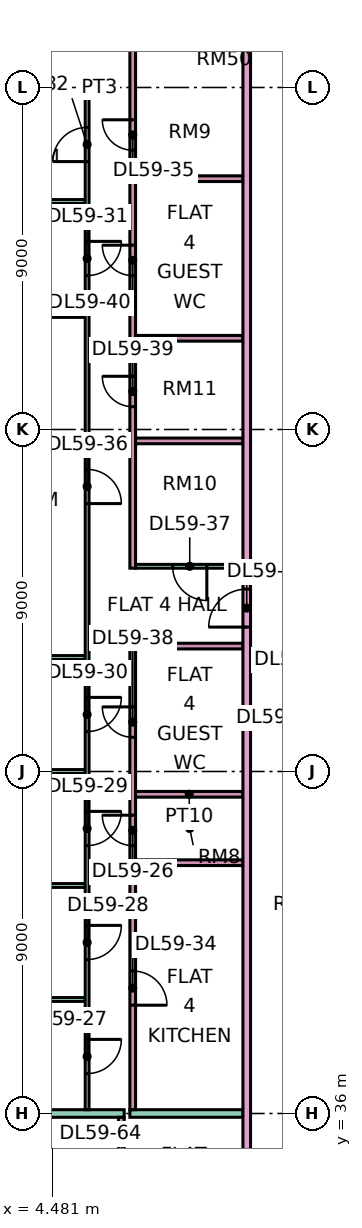
"""IFC4 building model, lengths in metres.
Left out: names, types, materials, properties, quantities, classifications, styles, units other than length and angle.
Written with IfcOpenShell. Run it as: python <this file> out.ifc"""

import sys

from ifc_helpers import new_model, si_unit, direction, frame, frame_2d, origin, place, context, subcontext, project, spatial, rectangle, extrude, element, fill, save


model = new_model("IFC4")
c1 = context("Model", 3, precision=1e-05, world=origin(), true_north=direction((0.0, 1.0)))
c2 = subcontext(c1, "Body", "Model", "MODEL_VIEW")
j1 = project(units=[si_unit("LENGTHUNIT", "METRE"), si_unit("PLANEANGLEUNIT", "RADIAN")], contexts=[c1])
p1 = place(None, origin())
s1 = spatial("IfcSite", under=j1, at=p1, CompositionType="ELEMENT")
p2 = place(p1, origin())
s2 = spatial("IfcBuilding", under=s1, at=p2, CompositionType="ELEMENT")
p3 = place(p2, frame((0.0, 0.0, 249.15)))
s3 = spatial("IfcBuildingStorey", under=s2, at=p3, CompositionType="ELEMENT", Elevation=249.15)
p4 = place(p3, frame((-1.351, 60.0, 0.0), z_axis=(0.0, 0.0, 1.0), x_axis=(1.0, 0.0, 0.0)))
e1 = element("IfcWall", 1, at=p4, inside=s3, PredefinedType="PARTITIONING", context=c2, shape_type="SweptSolid", body=[
    extrude(rectangle(XDim=6.701, YDim=0.1, at=frame_2d((3.351, 0.0))), origin(), (0.0, 0.0, 1.0), 3.35),
])
p5 = place(p3, frame((0.0, 36.0, 0.0), z_axis=(0.0, 0.0, 1.0), x_axis=(1.0, 0.0, 0.0)))
e2 = element("IfcWall", 2, at=p5, inside=s3, PredefinedType="PARTITIONING", context=c2, shape_type="SweptSolid", body=[
    extrude(rectangle(XDim=6.375, YDim=0.2, at=frame_2d((3.188, 0.0))), origin(), (0.0, 0.0, 1.0), 3.35),
])
p6 = place(p3, frame((0.0, 48.0, 0.0), z_axis=(0.0, 0.0, 1.0), x_axis=(1.0, 0.0, 0.0)))
e3 = element("IfcWall", 3, at=p6, inside=s3, PredefinedType="PARTITIONING", context=c2, shape_type="SweptSolid", body=[
    extrude(rectangle(XDim=5.35, YDim=0.1, at=frame_2d((2.675, 0.0))), origin(), (0.0, 0.0, 1.0), 3.35),
])
p7 = place(p3, frame((-1.35, 57.0, 0.0), z_axis=(0.0, 0.0, 1.0), x_axis=(1.0, 0.0, 0.0)))
e4 = element("IfcWall", 4, at=p7, inside=s3, PredefinedType="PARTITIONING", context=c2, shape_type="SweptSolid", body=[
    extrude(rectangle(XDim=6.7, YDim=0.1, at=frame_2d((3.35, 0.0))), origin(), (0.0, 0.0, 1.0), 3.35),
])
for number, where, z_axis, x_axis in (
    (5, (0.074, 39.0, 0.0), (0.0, 0.0, 1.0), (1.0, 0.0, 0.0)),
    (6, (0.074, 42.0, 0.0), (0.0, 0.0, 1.0), (1.0, 0.0, 0.0)),
    (7, (0.074, 45.0, 0.0), (0.0, 0.0, 1.0), (1.0, 0.0, 0.0)),
):
    element("IfcWall", number, at=place(p3, frame(where, z_axis=z_axis, x_axis=x_axis)), inside=s3, PredefinedType="PARTITIONING", context=c2, shape_type="SweptSolid", body=[
        extrude(rectangle(XDim=5.276, YDim=0.1, at=frame_2d((2.638, 0.0))), origin(), (0.0, 0.0, 1.0), 3.35),
    ])
p8 = place(p3, frame((5.4, 36.1, 0.0), z_axis=(0.0, 0.0, 1.0), x_axis=(0.0, 1.0, 0.0)))
e8 = element("IfcWall", 8, at=p8, inside=s3, PredefinedType="PARTITIONING", context=c2, shape_type="SweptSolid", body=[
    extrude(rectangle(XDim=26.95, YDim=0.1, at=frame_2d((13.475, 0.0))), origin(), (0.0, 0.0, 1.0), 3.35),
])
p9 = place(p8, frame((0.95, 0.0, 0.0)))
e9 = element("IfcOpeningElement", 9, at=p9, cuts=e8, PredefinedType="OPENING", context=c2, shape_type="SweptSolid", body=[
    extrude(rectangle(XDim=0.9, YDim=2.1, at=frame_2d((0.45, 1.05))), frame((0.0, 0.06, 0.0), z_axis=(0.0, -1.0, 0.0), x_axis=(1.0, 0.0, 0.0)), (0.0, 0.0, 1.0), 0.12),
])
p10 = place(p8, frame((3.95, 0.0, 0.0)))
e10 = element("IfcOpeningElement", 10, at=p10, cuts=e8, PredefinedType="OPENING", context=c2, shape_type="SweptSolid", body=[
    extrude(rectangle(XDim=0.9, YDim=2.1, at=frame_2d((0.45, 1.05))), frame((0.0, 0.06, 0.0), z_axis=(0.0, -1.0, 0.0), x_axis=(1.0, 0.0, 0.0)), (0.0, 0.0, 1.0), 0.12),
])
p11 = place(p8, frame((6.95, 0.0, 0.0)))
e11 = element("IfcOpeningElement", 11, at=p11, cuts=e8, PredefinedType="OPENING", context=c2, shape_type="SweptSolid", body=[
    extrude(rectangle(XDim=0.9, YDim=2.1, at=frame_2d((0.45, 1.05))), frame((0.0, 0.06, 0.0), z_axis=(0.0, -1.0, 0.0), x_axis=(1.0, 0.0, 0.0)), (0.0, 0.0, 1.0), 0.12),
])
p12 = place(p8, frame((9.95, 0.0, 0.0)))
e12 = element("IfcOpeningElement", 12, at=p12, cuts=e8, PredefinedType="OPENING", context=c2, shape_type="SweptSolid", body=[
    extrude(rectangle(XDim=0.9, YDim=2.1, at=frame_2d((0.45, 1.05))), frame((0.0, 0.06, 0.0), z_axis=(0.0, -1.0, 0.0), x_axis=(1.0, 0.0, 0.0)), (0.0, 0.0, 1.0), 0.12),
])
p13 = place(p8, frame((21.95, 0.0, 0.0)))
e13 = element("IfcOpeningElement", 13, at=p13, cuts=e8, PredefinedType="OPENING", context=c2, shape_type="SweptSolid", body=[
    extrude(rectangle(XDim=0.9, YDim=2.1, at=frame_2d((0.45, 1.05))), frame((0.0, 0.06, 0.0), z_axis=(0.0, -1.0, 0.0), x_axis=(1.0, 0.0, 0.0)), (0.0, 0.0, 1.0), 0.12),
])
p14 = place(p8, frame((24.95, 0.0, 0.0)))
e14 = element("IfcOpeningElement", 14, at=p14, cuts=e8, PredefinedType="OPENING", context=c2, shape_type="SweptSolid", body=[
    extrude(rectangle(XDim=0.9, YDim=2.1, at=frame_2d((0.45, 1.05))), frame((0.0, 0.06, 0.0), z_axis=(0.0, -1.0, 0.0), x_axis=(1.0, 0.0, 0.0)), (0.0, 0.0, 1.0), 0.12),
])
p15 = place(p8, frame((15.95, 0.0, 0.0)))
e15 = element("IfcOpeningElement", 15, at=p15, cuts=e8, PredefinedType="OPENING", context=c2, shape_type="SweptSolid", body=[
    extrude(rectangle(XDim=0.9, YDim=2.1, at=frame_2d((0.45, 1.05))), frame((0.0, 0.06, 0.0), z_axis=(0.0, -1.0, 0.0), x_axis=(1.0, 0.0, 0.0)), (0.0, 0.0, 1.0), 0.12),
])
p16 = place(p3, frame((5.45, 63.0, 0.0), z_axis=(0.0, 0.0, 1.0), x_axis=(1.0, 0.0, 0.0)))
e16 = element("IfcWall", 16, at=p16, inside=s3, PredefinedType="PARTITIONING", context=c2, shape_type="SweptSolid", body=[
    extrude(rectangle(XDim=0.55, YDim=0.1, at=frame_2d((0.275, 0.0))), origin(), (0.0, 0.0, 1.0), 3.35),
])
p17 = place(p3, frame((6.3, 26.325, 0.0), z_axis=(0.0, 0.0, 1.0), x_axis=(0.0, 1.0, 0.0)))
e17 = element("IfcWall", 17, at=p17, inside=s3, PredefinedType="PARTITIONING", context=c2, shape_type="SweptSolid", body=[
    extrude(rectangle(XDim=9.575, YDim=0.15, at=frame_2d((4.788, 0.0))), origin(), (0.0, 0.0, 1.0), 3.35),
])
p18 = place(p17, frame((4.575, 0.0, 0.0)))
e18 = element("IfcOpeningElement", 18, at=p18, cuts=e17, PredefinedType="OPENING", context=c2, shape_type="SweptSolid", body=[
    extrude(rectangle(XDim=0.8, YDim=2.1, at=frame_2d((0.4, 1.05))), frame((0.0, 0.085, 0.0), z_axis=(0.0, -1.0, 0.0), x_axis=(1.0, 0.0, 0.0)), (0.0, 0.0, 1.0), 0.17),
])
p19 = place(p17, frame((7.725, 0.0, 0.0)))
e19 = element("IfcOpeningElement", 19, at=p19, cuts=e17, PredefinedType="OPENING", context=c2, shape_type="SweptSolid", body=[
    extrude(rectangle(XDim=0.9, YDim=2.1, at=frame_2d((0.45, 1.05))), frame((0.0, 0.085, 0.0), z_axis=(0.0, -1.0, 0.0), x_axis=(1.0, 0.0, 0.0)), (0.0, 0.0, 1.0), 0.17),
])
p20 = place(p3, frame((6.525, 36.0, 0.0), z_axis=(0.0, 0.0, 1.0), x_axis=(1.0, 0.0, 0.0)))
e20 = element("IfcWall", 20, at=p20, inside=s3, PredefinedType="PARTITIONING", context=c2, shape_type="SweptSolid", body=[
    extrude(rectangle(XDim=2.975, YDim=0.2, at=frame_2d((1.488, 0.0))), origin(), (0.0, 0.0, 1.0), 3.35),
])
p21 = place(p3, frame((6.6, 36.1, 0.0), z_axis=(0.0, 0.0, 1.0), x_axis=(0.0, 1.0, 0.0)))
e21 = element("IfcWall", 21, at=p21, inside=s3, PredefinedType="PARTITIONING", context=c2, shape_type="SweptSolid", body=[
    extrude(rectangle(XDim=12.275, YDim=0.15, at=frame_2d((6.137, 0.0))), origin(), (0.0, 0.0, 1.0), 3.35),
])
p22 = place(p21, frame((6.95, 0.0, 0.0)))
e22 = element("IfcOpeningElement", 22, at=p22, cuts=e21, PredefinedType="OPENING", context=c2, shape_type="SweptSolid", body=[
    extrude(rectangle(XDim=0.8, YDim=2.1, at=frame_2d((0.4, 1.05))), frame((0.0, 0.085, 0.0), z_axis=(0.0, -1.0, 0.0), x_axis=(1.0, 0.0, 0.0)), (0.0, 0.0, 1.0), 0.17),
])
p23 = place(p21, frame((2.75, 0.0, 0.0)))
e23 = element("IfcOpeningElement", 23, at=p23, cuts=e21, PredefinedType="OPENING", context=c2, shape_type="SweptSolid", body=[
    extrude(rectangle(XDim=0.9, YDim=2.1, at=frame_2d((0.45, 1.05))), frame((0.0, 0.085, 0.0), z_axis=(0.0, -1.0, 0.0), x_axis=(1.0, 0.0, 0.0)), (0.0, 0.0, 1.0), 0.17),
])
p24 = place(p21, frame((9.8, 0.0, 0.0)))
e24 = element("IfcOpeningElement", 24, at=p24, cuts=e21, PredefinedType="OPENING", context=c2, shape_type="SweptSolid", body=[
    extrude(rectangle(XDim=0.8, YDim=2.1, at=frame_2d((0.4, 1.05))), frame((0.0, 0.085, 0.0), z_axis=(0.0, -1.0, 0.0), x_axis=(1.0, 0.0, 0.0)), (0.0, 0.0, 1.0), 0.17),
])
p25 = place(p3, frame((6.6, 50.35, 0.0), z_axis=(0.0, 0.0, 1.0), x_axis=(0.0, 1.0, 0.0)))
e25 = element("IfcWall", 25, at=p25, inside=s3, PredefinedType="PARTITIONING", context=c2, shape_type="SweptSolid", body=[
    extrude(rectangle(XDim=14.0, YDim=0.15, at=frame_2d((7.0, 0.0))), origin(), (0.0, 0.0, 1.0), 3.35),
])
p26 = place(p25, frame((11.0, 0.0, 0.0)))
e26 = element("IfcOpeningElement", 26, at=p26, cuts=e25, PredefinedType="OPENING", context=c2, shape_type="SweptSolid", body=[
    extrude(rectangle(XDim=0.8, YDim=2.1, at=frame_2d((0.4, 1.05))), frame((0.0, 0.085, 0.0), z_axis=(0.0, -1.0, 0.0), x_axis=(1.0, 0.0, 0.0)), (0.0, 0.0, 1.0), 0.17),
])
p27 = place(p25, frame((4.25, 0.0, 0.0)))
e27 = element("IfcOpeningElement", 27, at=p27, cuts=e25, PredefinedType="OPENING", context=c2, shape_type="SweptSolid", body=[
    extrude(rectangle(XDim=0.8, YDim=2.1, at=frame_2d((0.4, 1.05))), frame((0.0, 0.085, 0.0), z_axis=(0.0, -1.0, 0.0), x_axis=(1.0, 0.0, 0.0)), (0.0, 0.0, 1.0), 0.17),
])
p28 = place(p25, frame((7.7, 0.0, 0.0)))
e28 = element("IfcOpeningElement", 28, at=p28, cuts=e25, PredefinedType="OPENING", context=c2, shape_type="SweptSolid", body=[
    extrude(rectangle(XDim=0.8, YDim=2.1, at=frame_2d((0.4, 1.05))), frame((0.0, 0.085, 0.0), z_axis=(0.0, -1.0, 0.0), x_axis=(1.0, 0.0, 0.0)), (0.0, 0.0, 1.0), 0.17),
])
for number, where, z_axis, x_axis in (
    (29, (6.675, 42.6, 0.0), (0.0, 0.0, 1.0), (1.0, 0.0, 0.0)),
    (30, (6.675, 44.4, 0.0), (0.0, 0.0, 1.0), (1.0, 0.0, 0.0)),
    (31, (6.675, 48.3, 0.0), (0.0, 0.0, 1.0), (1.0, 0.0, 0.0)),
):
    element("IfcWall", number, at=place(p3, frame(where, z_axis=z_axis, x_axis=x_axis)), inside=s3, PredefinedType="PARTITIONING", context=c2, shape_type="SweptSolid", body=[
        extrude(rectangle(XDim=2.825, YDim=0.15, at=frame_2d((1.413, 0.0))), origin(), (0.0, 0.0, 1.0), 3.35),
    ])
p29 = place(p3, frame((6.675, 50.4, 0.0), z_axis=(0.0, 0.0, 1.0), x_axis=(1.0, 0.0, 0.0)))
e32 = element("IfcWall", 32, at=p29, inside=s3, PredefinedType="PARTITIONING", context=c2, shape_type="SweptSolid", body=[
    extrude(rectangle(XDim=2.825, YDim=0.1, at=frame_2d((1.413, 0.0))), origin(), (0.0, 0.0, 1.0), 3.35),
])
p30 = place(p29, frame((0.975, 0.0, 0.0)))
e33 = element("IfcOpeningElement", 33, at=p30, cuts=e32, PredefinedType="OPENING", context=c2, shape_type="SweptSolid", body=[
    extrude(rectangle(XDim=0.9, YDim=2.1, at=frame_2d((0.45, 1.05))), frame((0.0, 0.06, 0.0), z_axis=(0.0, -1.0, 0.0), x_axis=(1.0, 0.0, 0.0)), (0.0, 0.0, 1.0), 0.12),
])
for number, where, z_axis, x_axis in (
    (34, (6.675, 53.7, 0.0), (0.0, 0.0, 1.0), (1.0, 0.0, 0.0)),
    (35, (6.675, 56.4, 0.0), (0.0, 0.0, 1.0), (1.0, 0.0, 0.0)),
    (36, (6.675, 60.6, 0.0), (0.0, 0.0, 1.0), (1.0, 0.0, 0.0)),
):
    element("IfcWall", number, at=place(p3, frame(where, z_axis=z_axis, x_axis=x_axis)), inside=s3, PredefinedType="PARTITIONING", context=c2, shape_type="SweptSolid", body=[
        extrude(rectangle(XDim=2.825, YDim=0.15, at=frame_2d((1.413, 0.0))), origin(), (0.0, 0.0, 1.0), 3.35),
    ])
p31 = place(p3, frame((9.6, 20.0, 0.0), z_axis=(0.0, 0.0, 1.0), x_axis=(0.0, 1.0, 0.0)))
e37 = element("IfcWall", 37, at=p31, inside=s3, PredefinedType="PARTITIONING", context=c2, shape_type="SweptSolid", body=[
    extrude(rectangle(XDim=44.35, YDim=0.2, at=frame_2d((22.175, 0.0))), origin(), (0.0, 0.0, 1.0), 3.35),
])
p32 = place(p31, frame((28.8, 0.0, 0.0)))
e38 = element("IfcOpeningElement", 38, at=p32, cuts=e37, PredefinedType="OPENING", context=c2, shape_type="SweptSolid", body=[
    extrude(rectangle(XDim=1.0, YDim=2.1, at=frame_2d((0.5, 1.05))), frame((0.0, 0.11, 0.0), z_axis=(0.0, -1.0, 0.0), x_axis=(1.0, 0.0, 0.0)), (0.0, 0.0, 1.0), 0.22),
])
p33 = place(p31, frame((0.6, 0.0, 0.0)))
e39 = element("IfcOpeningElement", 39, at=p33, cuts=e37, PredefinedType="OPENING", context=c2, shape_type="SweptSolid", body=[
    extrude(rectangle(XDim=1.2, YDim=2.1, at=frame_2d((0.6, 1.05))), frame((0.0, 0.11, 0.0), z_axis=(0.0, -1.0, 0.0), x_axis=(1.0, 0.0, 0.0)), (0.0, 0.0, 1.0), 0.22),
])
p34 = place(p31, frame((3.9, 0.0, 0.0)))
e40 = element("IfcOpeningElement", 40, at=p34, cuts=e37, PredefinedType="OPENING", context=c2, shape_type="SweptSolid", body=[
    extrude(rectangle(XDim=1.0, YDim=2.1, at=frame_2d((0.5, 1.05))), frame((0.0, 0.11, 0.0), z_axis=(0.0, -1.0, 0.0), x_axis=(1.0, 0.0, 0.0)), (0.0, 0.0, 1.0), 0.22),
])
p35 = place(p22, frame((0.8, 0.0, 0.0), z_axis=(0.0, 0.0, 1.0), x_axis=(-1.0, 0.0, 0.0)))
e41 = element("IfcDoor", 41, at=p35, inside=s3, OperationType="SINGLE_SWING_RIGHT", PredefinedType="DOOR", context=c2, shape_type="SweptSolid", body=[
    extrude(rectangle(XDim=0.8, YDim=2.1, at=frame_2d((0.4, 1.05))), frame((0.0, 0.025, 0.0), z_axis=(0.0, -1.0, 0.0), x_axis=(1.0, 0.0, 0.0)), (0.0, 0.0, 1.0), 0.05),
])
fill(e22, e41)
p36 = place(p9, origin())
e42 = element("IfcDoor", 42, at=p36, inside=s3, OperationType="SINGLE_SWING_RIGHT", PredefinedType="DOOR", context=c2, shape_type="SweptSolid", body=[
    extrude(rectangle(XDim=0.9, YDim=2.1, at=frame_2d((0.45, 1.05))), frame((0.0, 0.025, 0.0), z_axis=(0.0, -1.0, 0.0), x_axis=(1.0, 0.0, 0.0)), (0.0, 0.0, 1.0), 0.05),
])
fill(e9, e42)
p37 = place(p10, origin())
e43 = element("IfcDoor", 43, at=p37, inside=s3, OperationType="SINGLE_SWING_RIGHT", PredefinedType="DOOR", context=c2, shape_type="SweptSolid", body=[
    extrude(rectangle(XDim=0.9, YDim=2.1, at=frame_2d((0.45, 1.05))), frame((0.0, 0.025, 0.0), z_axis=(0.0, -1.0, 0.0), x_axis=(1.0, 0.0, 0.0)), (0.0, 0.0, 1.0), 0.05),
])
fill(e10, e43)
p38 = place(p11, origin())
e44 = element("IfcDoor", 44, at=p38, inside=s3, OperationType="SINGLE_SWING_RIGHT", PredefinedType="DOOR", context=c2, shape_type="SweptSolid", body=[
    extrude(rectangle(XDim=0.9, YDim=2.1, at=frame_2d((0.45, 1.05))), frame((0.0, 0.025, 0.0), z_axis=(0.0, -1.0, 0.0), x_axis=(1.0, 0.0, 0.0)), (0.0, 0.0, 1.0), 0.05),
])
fill(e11, e44)
p39 = place(p12, origin())
e45 = element("IfcDoor", 45, at=p39, inside=s3, OperationType="SINGLE_SWING_RIGHT", PredefinedType="DOOR", context=c2, shape_type="SweptSolid", body=[
    extrude(rectangle(XDim=0.9, YDim=2.1, at=frame_2d((0.45, 1.05))), frame((0.0, 0.025, 0.0), z_axis=(0.0, -1.0, 0.0), x_axis=(1.0, 0.0, 0.0)), (0.0, 0.0, 1.0), 0.05),
])
fill(e12, e45)
p40 = place(p13, origin())
e46 = element("IfcDoor", 46, at=p40, inside=s3, OperationType="SINGLE_SWING_RIGHT", PredefinedType="DOOR", context=c2, shape_type="SweptSolid", body=[
    extrude(rectangle(XDim=0.9, YDim=2.1, at=frame_2d((0.45, 1.05))), frame((0.0, 0.025, 0.0), z_axis=(0.0, -1.0, 0.0), x_axis=(1.0, 0.0, 0.0)), (0.0, 0.0, 1.0), 0.05),
])
fill(e13, e46)
p41 = place(p14, origin())
e47 = element("IfcDoor", 47, at=p41, inside=s3, OperationType="SINGLE_SWING_LEFT", PredefinedType="DOOR", context=c2, shape_type="SweptSolid", body=[
    extrude(rectangle(XDim=0.9, YDim=2.1, at=frame_2d((0.45, 1.05))), frame((0.0, 0.025, 0.0), z_axis=(0.0, -1.0, 0.0), x_axis=(1.0, 0.0, 0.0)), (0.0, 0.0, 1.0), 0.05),
])
fill(e14, e47)
p42 = place(p32, origin())
e48 = element("IfcDoor", 48, at=p42, inside=s3, OperationType="SINGLE_SWING_LEFT", PredefinedType="DOOR", context=c2, shape_type="SweptSolid", body=[
    extrude(rectangle(XDim=1.0, YDim=2.1, at=frame_2d((0.5, 1.05))), frame((0.0, 0.025, 0.0), z_axis=(0.0, -1.0, 0.0), x_axis=(1.0, 0.0, 0.0)), (0.0, 0.0, 1.0), 0.05),
])
fill(e38, e48)
p43 = place(p23, frame((0.9, 0.0, 0.0), z_axis=(0.0, 0.0, 1.0), x_axis=(-1.0, 0.0, 0.0)))
e49 = element("IfcDoor", 49, at=p43, inside=s3, OperationType="SINGLE_SWING_LEFT", PredefinedType="DOOR", context=c2, shape_type="SweptSolid", body=[
    extrude(rectangle(XDim=0.9, YDim=2.1, at=frame_2d((0.45, 1.05))), frame((0.0, 0.025, 0.0), z_axis=(0.0, -1.0, 0.0), x_axis=(1.0, 0.0, 0.0)), (0.0, 0.0, 1.0), 0.05),
])
fill(e23, e49)
p44 = place(p26, frame((0.8, 0.0, 0.0), z_axis=(0.0, 0.0, 1.0), x_axis=(-1.0, 0.0, 0.0)))
e50 = element("IfcDoor", 50, at=p44, inside=s3, OperationType="SINGLE_SWING_RIGHT", PredefinedType="DOOR", context=c2, shape_type="SweptSolid", body=[
    extrude(rectangle(XDim=0.8, YDim=2.1, at=frame_2d((0.4, 1.05))), frame((0.0, 0.025, 0.0), z_axis=(0.0, -1.0, 0.0), x_axis=(1.0, 0.0, 0.0)), (0.0, 0.0, 1.0), 0.05),
])
fill(e26, e50)
p45 = place(p15, frame((0.9, 0.0, 0.0), z_axis=(0.0, 0.0, 1.0), x_axis=(-1.0, 0.0, 0.0)))
e51 = element("IfcDoor", 51, at=p45, inside=s3, OperationType="SINGLE_SWING_LEFT", PredefinedType="DOOR", context=c2, shape_type="SweptSolid", body=[
    extrude(rectangle(XDim=0.9, YDim=2.1, at=frame_2d((0.45, 1.05))), frame((0.0, 0.025, 0.0), z_axis=(0.0, -1.0, 0.0), x_axis=(1.0, 0.0, 0.0)), (0.0, 0.0, 1.0), 0.05),
])
fill(e15, e51)
p46 = place(p30, origin())
e52 = element("IfcDoor", 52, at=p46, inside=s3, OperationType="SINGLE_SWING_RIGHT", PredefinedType="DOOR", context=c2, shape_type="SweptSolid", body=[
    extrude(rectangle(XDim=0.9, YDim=2.1, at=frame_2d((0.45, 1.05))), frame((0.0, 0.025, 0.0), z_axis=(0.0, -1.0, 0.0), x_axis=(1.0, 0.0, 0.0)), (0.0, 0.0, 1.0), 0.05),
])
fill(e33, e52)
p47 = place(p24, frame((0.8, 0.0, 0.0), z_axis=(0.0, 0.0, 1.0), x_axis=(-1.0, 0.0, 0.0)))
e53 = element("IfcDoor", 53, at=p47, inside=s3, OperationType="SINGLE_SWING_RIGHT", PredefinedType="DOOR", context=c2, shape_type="SweptSolid", body=[
    extrude(rectangle(XDim=0.8, YDim=2.1, at=frame_2d((0.4, 1.05))), frame((0.0, 0.025, 0.0), z_axis=(0.0, -1.0, 0.0), x_axis=(1.0, 0.0, 0.0)), (0.0, 0.0, 1.0), 0.05),
])
fill(e24, e53)
p48 = place(p27, frame((0.8, 0.0, 0.0), z_axis=(0.0, 0.0, 1.0), x_axis=(-1.0, 0.0, 0.0)))
e54 = element("IfcDoor", 54, at=p48, inside=s3, OperationType="SINGLE_SWING_RIGHT", PredefinedType="DOOR", context=c2, shape_type="SweptSolid", body=[
    extrude(rectangle(XDim=0.8, YDim=2.1, at=frame_2d((0.4, 1.05))), frame((0.0, 0.025, 0.0), z_axis=(0.0, -1.0, 0.0), x_axis=(1.0, 0.0, 0.0)), (0.0, 0.0, 1.0), 0.05),
])
fill(e27, e54)
p49 = place(p28, frame((0.8, 0.0, 0.0), z_axis=(0.0, 0.0, 1.0), x_axis=(-1.0, 0.0, 0.0)))
e55 = element("IfcDoor", 55, at=p49, inside=s3, OperationType="SINGLE_SWING_RIGHT", PredefinedType="DOOR", context=c2, shape_type="SweptSolid", body=[
    extrude(rectangle(XDim=0.8, YDim=2.1, at=frame_2d((0.4, 1.05))), frame((0.0, 0.025, 0.0), z_axis=(0.0, -1.0, 0.0), x_axis=(1.0, 0.0, 0.0)), (0.0, 0.0, 1.0), 0.05),
])
fill(e28, e55)
save(model, sys.argv[1])
